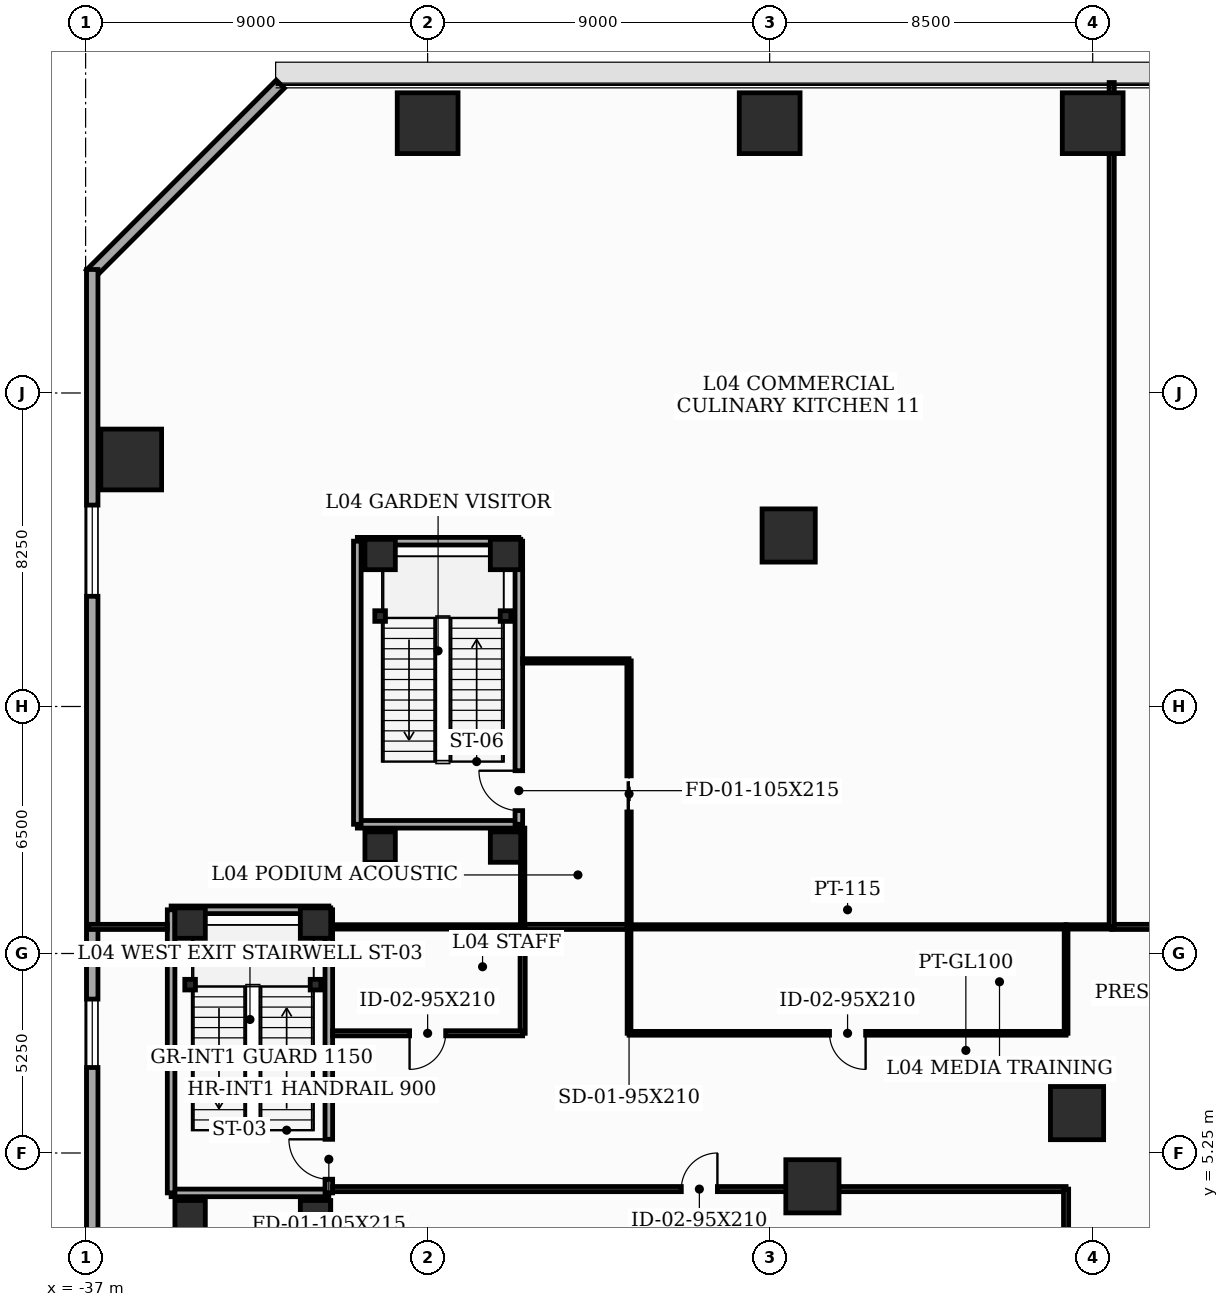
"""IFC4 building model, lengths in metres.
Left out: names, types, materials, properties, quantities, classifications, styles, units other than length and angle.
Written with IfcOpenShell. Run it as: python <this file> out.ifc"""

import sys

from ifc_helpers import new_model, si_unit, direction, frame, frame_2d, origin, origin_2d, place, context, subcontext, project, spatial, rectangle, i_section, extrude, element, fill, save


model = new_model("IFC4")
c1 = context("Model", 3, precision=1e-05, world=origin(), true_north=direction((0.0, 1.0)))
c2 = subcontext(c1, "Body", "Model", "MODEL_VIEW")
j1 = project(units=[si_unit("LENGTHUNIT", "METRE"), si_unit("PLANEANGLEUNIT", "RADIAN")], contexts=[c1])
p1 = place(None, origin())
s1 = spatial("IfcSite", under=j1, at=p1, CompositionType="ELEMENT")
p2 = place(p1, origin())
s2 = spatial("IfcBuilding", under=s1, at=p2, CompositionType="ELEMENT")
p3 = place(p2, frame((0.0, 0.0, 20.8)))
s3 = spatial("IfcBuildingStorey", under=s2, at=p3, CompositionType="ELEMENT", Elevation=20.8)
p4 = place(p3, frame((-10.912, 6.3, 0.0), z_axis=(0.0, 0.0, 1.0), x_axis=(1.0, 0.0, 0.0)))
e1 = element("IfcColumn", 1, at=p4, inside=s3, PredefinedType="COLUMN", context=c2, shape_type="SweptSolid", body=[
    extrude(rectangle(XDim=1.4, YDim=1.4, at=origin_2d()), origin(), (0.0, 0.0, 1.0), 5.2),
])
for number, where, z_axis, x_axis in (
    (2, (-10.5, 32.35, 0.0), (0.0, 0.0, 1.0), (1.0, 0.0, 0.0)),
    (3, (-19.0, 32.35, 0.0), (0.0, 0.0, 1.0), (1.0, 0.0, 0.0)),
    (4, (-28.0, 32.35, 0.0), (0.0, 0.0, 1.0), (1.0, 0.0, 0.0)),
    (5, (-35.8, 23.5, 0.0), (0.0, 0.0, 1.0), (1.0, 0.0, 0.0)),
):
    element("IfcColumn", number, at=place(p3, frame(where, z_axis=z_axis, x_axis=x_axis)), inside=s3, PredefinedType="COLUMN", context=c2, shape_type="SweptSolid", body=[
        extrude(rectangle(XDim=1.6, YDim=1.6, at=origin_2d()), origin(), (0.0, 0.0, 1.0), 5.2),
    ])
for number, where, z_axis, x_axis in (
    (6, (-18.5, 21.5, 0.0), (0.0, 0.0, 1.0), (1.0, 0.0, 0.0)),
    (7, (-17.875, 4.373, 0.0), (0.0, 0.0, 1.0), (1.0, 0.0, 0.0)),
):
    element("IfcColumn", number, at=place(p3, frame(where, z_axis=z_axis, x_axis=x_axis)), inside=s3, PredefinedType="COLUMN", context=c2, shape_type="SweptSolid", body=[
        extrude(rectangle(XDim=1.4, YDim=1.4, at=origin_2d()), origin(), (0.0, 0.0, 1.0), 5.2),
    ])
for number, where, z_axis, x_axis in (
    (8, (-34.25, 3.6, 0.0), (0.0, 0.0, 1.0), (1.0, 0.0, 0.0)),
    (9, (-30.95, 3.6, 0.0), (0.0, 0.0, 1.0), (1.0, 0.0, 0.0)),
    (10, (-30.95, 11.3, 0.0), (0.0, 0.0, 1.0), (1.0, 0.0, 0.0)),
    (11, (-34.25, 11.3, 0.0), (0.0, 0.0, 1.0), (1.0, 0.0, 0.0)),
):
    element("IfcColumn", number, at=place(p3, frame(where, z_axis=z_axis, x_axis=x_axis)), inside=s3, PredefinedType="COLUMN", context=c2, shape_type="SweptSolid", body=[
        extrude(rectangle(XDim=0.8, YDim=0.8, at=origin_2d()), origin(), (0.0, 0.0, 1.0), 5.2),
    ])
for number, where, z_axis, x_axis in (
    (12, (-34.25, 9.68, 0.0), (0.0, 0.0, 1.0), (1.0, 0.0, 0.0)),
    (13, (-30.95, 9.68, 0.0), (0.0, 0.0, 1.0), (1.0, 0.0, 0.0)),
):
    element("IfcColumn", number, at=place(p3, frame(where, z_axis=z_axis, x_axis=x_axis)), inside=s3, PredefinedType="PILASTER", context=c2, shape_type="SweptSolid", body=[
        extrude(i_section(OverallWidth=0.28, OverallDepth=0.28, WebThickness=0.01, FlangeThickness=0.018, at=origin_2d()), origin(), (0.0, 0.0, 1.0), 5.2),
    ])
for number, where, z_axis, x_axis in (
    (14, (-29.25, 13.3, 0.0), (0.0, 0.0, 1.0), (1.0, 0.0, 0.0)),
    (15, (-25.95, 13.3, 0.0), (0.0, 0.0, 1.0), (1.0, 0.0, 0.0)),
    (16, (-25.95, 21.0, 0.0), (0.0, 0.0, 1.0), (1.0, 0.0, 0.0)),
    (17, (-29.25, 21.0, 0.0), (0.0, 0.0, 1.0), (1.0, 0.0, 0.0)),
):
    element("IfcColumn", number, at=place(p3, frame(where, z_axis=z_axis, x_axis=x_axis)), inside=s3, PredefinedType="COLUMN", context=c2, shape_type="SweptSolid", body=[
        extrude(rectangle(XDim=0.8, YDim=0.8, at=origin_2d()), origin(), (0.0, 0.0, 1.0), 5.2),
    ])
for number, where, z_axis, x_axis in (
    (18, (-29.25, 19.38, 0.0), (0.0, 0.0, 1.0), (1.0, 0.0, 0.0)),
    (19, (-25.95, 19.38, 0.0), (0.0, 0.0, 1.0), (1.0, 0.0, 0.0)),
):
    element("IfcColumn", number, at=place(p3, frame(where, z_axis=z_axis, x_axis=x_axis)), inside=s3, PredefinedType="PILASTER", context=c2, shape_type="SweptSolid", body=[
        extrude(i_section(OverallWidth=0.28, OverallDepth=0.28, WebThickness=0.01, FlangeThickness=0.018, at=origin_2d()), origin(), (0.0, 0.0, 1.0), 5.2),
    ])
p5 = place(p3, frame((-31.876, 33.376, 0.0), z_axis=(0.0, 0.0, 1.0), x_axis=(-0.707106781187, -0.707106781187, 0.0)))
e20 = element("IfcWall", 20, at=p5, inside=s3, PredefinedType="SOLIDWALL", context=c2, shape_type="SweptSolid", body=[
    extrude(rectangle(XDim=7.071, YDim=0.3, at=frame_2d((3.536, 0.0))), origin(), (0.0, 0.0, 1.0), 4.94),
])
p6 = place(p3, frame((-36.825, 28.5, 0.0), z_axis=(0.0, 0.0, 1.0), x_axis=(0.0, -1.0, 0.0)))
e21 = element("IfcWall", 21, at=p6, inside=s3, PredefinedType="SOLIDWALL", context=c2, shape_type="SweptSolid", body=[
    extrude(rectangle(XDim=48.0, YDim=0.3, at=frame_2d((24.0, 0.0))), origin(), (0.0, 0.0, 1.0), 4.94),
])
p7 = place(p6, frame((6.2, 0.0, 0.9)))
e22 = element("IfcOpeningElement", 22, at=p7, cuts=e21, PredefinedType="OPENING", context=c2, shape_type="SweptSolid", body=[
    extrude(rectangle(XDim=2.4, YDim=1.35, at=frame_2d((1.2, 0.675))), frame((0.0, 0.16, 0.0), z_axis=(0.0, -1.0, 0.0), x_axis=(1.0, 0.0, 0.0)), (0.0, 0.0, 1.0), 0.32),
])
p8 = place(p6, frame((19.2, 0.0, 0.9)))
e23 = element("IfcOpeningElement", 23, at=p8, cuts=e21, PredefinedType="OPENING", context=c2, shape_type="SweptSolid", body=[
    extrude(rectangle(XDim=1.8, YDim=1.35, at=frame_2d((0.9, 0.675))), frame((0.0, 0.16, 0.0), z_axis=(0.0, -1.0, 0.0), x_axis=(1.0, 0.0, 0.0)), (0.0, 0.0, 1.0), 0.32),
])
p9 = place(p6, frame((36.2, 0.0, 0.9)))
e24 = element("IfcOpeningElement", 24, at=p9, cuts=e21, PredefinedType="OPENING", context=c2, shape_type="SweptSolid", body=[
    extrude(rectangle(XDim=2.4, YDim=1.35, at=frame_2d((1.2, 0.675))), frame((0.0, 0.16, 0.0), z_axis=(0.0, -1.0, 0.0), x_axis=(1.0, 0.0, 0.0)), (0.0, 0.0, 1.0), 0.32),
])
p10 = place(p3, frame((-34.75, 4.2, 0.0), z_axis=(0.0, 0.0, 1.0), x_axis=(1.0, 0.0, 0.0)))
e25 = element("IfcWall", 25, at=p10, inside=s3, PredefinedType="SOLIDWALL", context=c2, shape_type="SweptSolid", body=[
    extrude(rectangle(XDim=4.15, YDim=0.2, at=frame_2d((2.075, 0.0))), origin(), (0.0, 0.0, 1.0), 4.94),
])
p11 = place(p3, frame((-30.6, 4.2, 0.0), z_axis=(0.0, 0.0, 1.0), x_axis=(0.0, 1.0, 0.0)))
e26 = element("IfcWall", 26, at=p11, inside=s3, PredefinedType="SOLIDWALL", context=c2, shape_type="SweptSolid", body=[
    extrude(rectangle(XDim=7.45, YDim=0.2, at=frame_2d((3.725, 0.0))), origin(), (0.0, 0.0, 1.0), 4.94),
])
p12 = place(p11, frame((0.36, 0.0, 0.0)))
e27 = element("IfcOpeningElement", 27, at=p12, cuts=e26, PredefinedType="OPENING", context=c2, shape_type="SweptSolid", body=[
    extrude(rectangle(XDim=1.05, YDim=2.15, at=frame_2d((0.525, 1.075))), frame((0.0, 0.11, 0.0), z_axis=(0.0, -1.0, 0.0), x_axis=(1.0, 0.0, 0.0)), (0.0, 0.0, 1.0), 0.22),
])
p13 = place(p3, frame((-30.6, 11.65, 0.0), z_axis=(0.0, 0.0, 1.0), x_axis=(-1.0, 0.0, 0.0)))
e28 = element("IfcWall", 28, at=p13, inside=s3, PredefinedType="SOLIDWALL", context=c2, shape_type="SweptSolid", body=[
    extrude(rectangle(XDim=4.15, YDim=0.2, at=frame_2d((2.075, 0.0))), origin(), (0.0, 0.0, 1.0), 4.94),
])
p14 = place(p3, frame((-34.75, 11.65, 0.0), z_axis=(0.0, 0.0, 1.0), x_axis=(0.0, -1.0, 0.0)))
e29 = element("IfcWall", 29, at=p14, inside=s3, PredefinedType="SOLIDWALL", context=c2, shape_type="SweptSolid", body=[
    extrude(rectangle(XDim=7.45, YDim=0.2, at=frame_2d((3.725, 0.0))), origin(), (0.0, 0.0, 1.0), 4.94),
])
p15 = place(p3, frame((-29.85, 13.9, 0.0), z_axis=(0.0, 0.0, 1.0), x_axis=(1.0, 0.0, 0.0)))
e30 = element("IfcWall", 30, at=p15, inside=s3, PredefinedType="SOLIDWALL", context=c2, shape_type="SweptSolid", body=[
    extrude(rectangle(XDim=4.25, YDim=0.2, at=frame_2d((2.125, 0.0))), origin(), (0.0, 0.0, 1.0), 4.425),
])
p16 = place(p3, frame((-25.6, 13.9, 0.0), z_axis=(0.0, 0.0, 1.0), x_axis=(0.0, 1.0, 0.0)))
e31 = element("IfcWall", 31, at=p16, inside=s3, PredefinedType="SOLIDWALL", context=c2, shape_type="SweptSolid", body=[
    extrude(rectangle(XDim=7.45, YDim=0.2, at=frame_2d((3.725, 0.0))), origin(), (0.0, 0.0, 1.0), 4.425),
])
p17 = place(p16, frame((0.36, 0.0, 0.0)))
e32 = element("IfcOpeningElement", 32, at=p17, cuts=e31, PredefinedType="OPENING", context=c2, shape_type="SweptSolid", body=[
    extrude(rectangle(XDim=1.05, YDim=2.15, at=frame_2d((0.525, 1.075))), frame((0.0, 0.11, 0.0), z_axis=(0.0, -1.0, 0.0), x_axis=(1.0, 0.0, 0.0)), (0.0, 0.0, 1.0), 0.22),
])
p18 = place(p3, frame((-25.6, 21.35, 0.0), z_axis=(0.0, 0.0, 1.0), x_axis=(-1.0, 0.0, 0.0)))
e33 = element("IfcWall", 33, at=p18, inside=s3, PredefinedType="SOLIDWALL", context=c2, shape_type="SweptSolid", body=[
    extrude(rectangle(XDim=4.25, YDim=0.2, at=frame_2d((2.125, 0.0))), origin(), (0.0, 0.0, 1.0), 4.94),
])
p19 = place(p3, frame((-29.85, 21.35, 0.0), z_axis=(0.0, 0.0, 1.0), x_axis=(0.0, -1.0, 0.0)))
e34 = element("IfcWall", 34, at=p19, inside=s3, PredefinedType="SOLIDWALL", context=c2, shape_type="SweptSolid", body=[
    extrude(rectangle(XDim=7.45, YDim=0.2, at=frame_2d((3.725, 0.0))), origin(), (0.0, 0.0, 1.0), 4.425),
])
p20 = place(p3, frame((-22.7, 11.2, 0.0), z_axis=(0.0, 0.0, 1.0), x_axis=(-1.0, 0.0, 0.0)))
e35 = element("IfcWall", 35, at=p20, inside=s3, PredefinedType="PARTITIONING", context=c2, shape_type="SweptSolid", body=[
    extrude(rectangle(XDim=2.8, YDim=0.135, at=frame_2d((1.4, 0.0))), origin(), (0.0, 0.0, 1.0), 4.94),
])
p21 = place(p3, frame((-30.5, 4.3, 0.0), z_axis=(0.0, 0.0, 1.0), x_axis=(1.0, 0.0, 0.0)))
e36 = element("IfcWall", 36, at=p21, inside=s3, PredefinedType="PARTITIONING", context=c2, shape_type="SweptSolid", body=[
    extrude(rectangle(XDim=19.3, YDim=0.135, at=frame_2d((9.65, 0.0))), origin(), (0.0, 0.0, 1.0), 3.525),
])
p22 = place(p21, frame((9.175, 0.0, 0.0)))
e37 = element("IfcOpeningElement", 37, at=p22, cuts=e36, PredefinedType="OPENING", context=c2, shape_type="SweptSolid", body=[
    extrude(rectangle(XDim=0.95, YDim=2.1, at=frame_2d((0.475, 1.05))), frame((0.0, 0.077, 0.0), z_axis=(0.0, -1.0, 0.0), x_axis=(1.0, 0.0, 0.0)), (0.0, 0.0, 1.0), 0.155),
])
p23 = place(p3, frame((-11.2, 4.3, 0.0), z_axis=(0.0, 0.0, 1.0), x_axis=(0.0, -1.0, 0.0)))
e38 = element("IfcWall", 38, at=p23, inside=s3, PredefinedType="PARTITIONING", context=c2, shape_type="SweptSolid", body=[
    extrude(rectangle(XDim=7.9, YDim=0.135, at=frame_2d((3.95, 0.0))), origin(), (0.0, 0.0, 1.0), 3.525),
])
p24 = place(p3, frame((7.0, 11.2, 0.0), z_axis=(0.0, 0.0, 1.0), x_axis=(-1.0, 0.0, 0.0)))
e39 = element("IfcWall", 39, at=p24, inside=s3, PredefinedType="PARTITIONING", context=c2, shape_type="SweptSolid", body=[
    extrude(rectangle(XDim=17.0, YDim=0.135, at=frame_2d((8.5, 0.0))), origin(), (0.0, 0.0, 1.0), 3.525),
])
p25 = place(p24, frame((10.065, 0.0, 0.0)))
e40 = element("IfcOpeningElement", 40, at=p25, cuts=e39, PredefinedType="OPENING", context=c2, shape_type="SweptSolid", body=[
    extrude(rectangle(XDim=0.95, YDim=2.1, at=frame_2d((0.475, 1.05))), frame((0.0, 0.077, 0.0), z_axis=(0.0, -1.0, 0.0), x_axis=(1.0, 0.0, 0.0)), (0.0, 0.0, 1.0), 0.155),
])
p26 = place(p3, frame((-10.0, 11.2, 0.0), z_axis=(0.0, 0.0, 1.0), x_axis=(-1.0, 0.0, 0.0)))
e41 = element("IfcWall", 41, at=p26, inside=s3, PredefinedType="PARTITIONING", context=c2, shape_type="SweptSolid", body=[
    extrude(rectangle(XDim=1.2, YDim=0.115, at=frame_2d((0.6, 0.0))), origin(), (0.0, 0.0, 1.0), 3.525),
])
p27 = place(p3, frame((-11.2, 11.2, 0.0), z_axis=(0.0, 0.0, 1.0), x_axis=(0.0, -1.0, 0.0)))
e42 = element("IfcWall", 42, at=p27, inside=s3, PredefinedType="MOVABLE", context=c2, shape_type="SweptSolid", body=[
    extrude(rectangle(XDim=2.8, YDim=0.1, at=frame_2d((1.4, 0.0))), origin(), (0.0, 0.0, 1.0), 3.525),
])
p28 = place(p3, frame((-11.2, 8.4, 0.0), z_axis=(0.0, 0.0, 1.0), x_axis=(-1.0, 0.0, 0.0)))
e43 = element("IfcWall", 43, at=p28, inside=s3, PredefinedType="MOVABLE", context=c2, shape_type="SweptSolid", body=[
    extrude(rectangle(XDim=11.5, YDim=0.1, at=frame_2d((5.75, 0.0))), origin(), (0.0, 0.0, 1.0), 3.525),
])
p29 = place(p28, frame((5.275, 0.0, 0.0)))
e44 = element("IfcOpeningElement", 44, at=p29, cuts=e43, PredefinedType="OPENING", context=c2, shape_type="SweptSolid", body=[
    extrude(rectangle(XDim=0.95, YDim=2.1, at=frame_2d((0.475, 1.05))), frame((0.0, 0.06, 0.0), z_axis=(0.0, -1.0, 0.0), x_axis=(1.0, 0.0, 0.0)), (0.0, 0.0, 1.0), 0.12),
])
p30 = place(p3, frame((-22.7, 8.4, 0.0), z_axis=(0.0, 0.0, 1.0), x_axis=(0.0, 1.0, 0.0)))
e45 = element("IfcWall", 45, at=p30, inside=s3, PredefinedType="MOVABLE", context=c2, shape_type="SweptSolid", body=[
    extrude(rectangle(XDim=2.8, YDim=0.1, at=frame_2d((1.4, 0.0))), origin(), (0.0, 0.0, 1.0), 4.94),
])
p31 = place(p3, frame((-25.5, 11.2, 0.0), z_axis=(0.0, 0.0, 1.0), x_axis=(0.0, -1.0, 0.0)))
e46 = element("IfcWall", 46, at=p31, inside=s3, PredefinedType="PARTITIONING", context=c2, shape_type="SweptSolid", body=[
    extrude(rectangle(XDim=2.8, YDim=0.135, at=frame_2d((1.4, 0.0))), origin(), (0.0, 0.0, 1.0), 4.94),
])
p32 = place(p3, frame((-25.5, 8.4, 0.0), z_axis=(0.0, 0.0, 1.0), x_axis=(-1.0, 0.0, 0.0)))
e47 = element("IfcWall", 47, at=p32, inside=s3, PredefinedType="PARTITIONING", context=c2, shape_type="SweptSolid", body=[
    extrude(rectangle(XDim=5.0, YDim=0.135, at=frame_2d((2.5, 0.0))), origin(), (0.0, 0.0, 1.0), 4.94),
])
p33 = place(p32, frame((2.025, 0.0, 0.0)))
e48 = element("IfcOpeningElement", 48, at=p33, cuts=e47, PredefinedType="OPENING", context=c2, shape_type="SweptSolid", body=[
    extrude(rectangle(XDim=0.95, YDim=2.1, at=frame_2d((0.475, 1.05))), frame((0.0, 0.077, 0.0), z_axis=(0.0, -1.0, 0.0), x_axis=(1.0, 0.0, 0.0)), (0.0, 0.0, 1.0), 0.155),
])
p34 = place(p3, frame((-25.5, 13.8, 0.0), z_axis=(0.0, 0.0, 1.0), x_axis=(0.0, -1.0, 0.0)))
e49 = element("IfcWall", 49, at=p34, inside=s3, PredefinedType="PARTITIONING", context=c2, shape_type="SweptSolid", body=[
    extrude(rectangle(XDim=2.6, YDim=0.115, at=frame_2d((1.3, 0.0))), origin(), (0.0, 0.0, 1.0), 4.425),
])
p35 = place(p3, frame((-22.7, 11.2, 0.0), z_axis=(0.0, 0.0, 1.0), x_axis=(0.0, 1.0, 0.0)))
e50 = element("IfcWall", 50, at=p35, inside=s3, PredefinedType="PARTITIONING", context=c2, shape_type="SweptSolid", body=[
    extrude(rectangle(XDim=7.0, YDim=0.115, at=frame_2d((3.5, 0.0))), origin(), (0.0, 0.0, 1.0), 4.425),
])
p36 = place(p35, frame((3.025, 0.0, 0.0)))
e51 = element("IfcOpeningElement", 51, at=p36, cuts=e50, PredefinedType="OPENING", context=c2, shape_type="SweptSolid", body=[
    extrude(rectangle(XDim=0.95, YDim=2.1, at=frame_2d((0.475, 1.05))), frame((0.0, 0.067, 0.0), z_axis=(0.0, -1.0, 0.0), x_axis=(1.0, 0.0, 0.0)), (0.0, 0.0, 1.0), 0.135),
])
p37 = place(p3, frame((-22.7, 18.2, 0.0), z_axis=(0.0, 0.0, 1.0), x_axis=(-1.0, 0.0, 0.0)))
e52 = element("IfcWall", 52, at=p37, inside=s3, PredefinedType="PARTITIONING", context=c2, shape_type="SweptSolid", body=[
    extrude(rectangle(XDim=2.8, YDim=0.115, at=frame_2d((1.4, 0.0))), origin(), (0.0, 0.0, 1.0), 4.94),
])
p38 = place(p3, frame((-34.85, 11.2, 0.0), z_axis=(0.0, 0.0, 1.0), x_axis=(-1.0, 0.0, 0.0)))
e53 = element("IfcWall", 53, at=p38, inside=s3, PredefinedType="PARTITIONING", context=c2, shape_type="SweptSolid", body=[
    extrude(rectangle(XDim=2.07, YDim=0.135, at=frame_2d((1.035, 0.0))), origin(), (0.0, 0.0, 1.0), 3.425),
])
p39 = place(p3, frame((-10.0, 33.42, 0.0), z_axis=(0.0, 0.0, 1.0), x_axis=(0.0, -1.0, 0.0)))
e54 = element("IfcWall", 54, at=p39, inside=s3, PredefinedType="PARTITIONING", context=c2, shape_type="SweptSolid", body=[
    extrude(rectangle(XDim=22.22, YDim=0.135, at=frame_2d((11.11, 0.0))), origin(), (0.0, 0.0, 1.0), 3.425),
])
p40 = place(p3, frame((-22.7, 11.2, 0.0), z_axis=(0.0, 0.0, 1.0), x_axis=(1.0, 0.0, 0.0)))
e55 = element("IfcWall", 55, at=p40, inside=s3, PredefinedType="PARTITIONING", context=c2, shape_type="SweptSolid", body=[
    extrude(rectangle(XDim=11.5, YDim=0.115, at=frame_2d((5.75, 0.0))), origin(), (0.0, 0.0, 1.0), 3.525),
])
p41 = place(p3, frame((-30.5, 11.2, 0.0), z_axis=(0.0, 0.0, 1.0), x_axis=(1.0, 0.0, 0.0)))
e56 = element("IfcWall", 56, at=p41, inside=s3, PredefinedType="PARTITIONING", context=c2, shape_type="SweptSolid", body=[
    extrude(rectangle(XDim=5.0, YDim=0.115, at=frame_2d((2.5, 0.0))), origin(), (0.0, 0.0, 1.0), 4.94),
])
p42 = place(p7, origin())
e57 = element("IfcWindow", 57, at=p42, inside=s3, PartitioningType="SINGLE_PANEL", PredefinedType="WINDOW", context=c2, shape_type="SweptSolid", body=[
    extrude(rectangle(XDim=2.4, YDim=1.35, at=frame_2d((1.2, 0.675))), frame((0.0, 0.03, 0.0), z_axis=(0.0, -1.0, 0.0), x_axis=(1.0, 0.0, 0.0)), (0.0, 0.0, 1.0), 0.06),
])
fill(e22, e57)
p43 = place(p8, origin())
e58 = element("IfcWindow", 58, at=p43, inside=s3, PartitioningType="SINGLE_PANEL", PredefinedType="WINDOW", context=c2, shape_type="SweptSolid", body=[
    extrude(rectangle(XDim=1.8, YDim=1.35, at=frame_2d((0.9, 0.675))), frame((0.0, 0.03, 0.0), z_axis=(0.0, -1.0, 0.0), x_axis=(1.0, 0.0, 0.0)), (0.0, 0.0, 1.0), 0.06),
])
fill(e23, e58)
p44 = place(p12, origin())
e59 = element("IfcDoor", 59, at=p44, inside=s3, OperationType="SINGLE_SWING_RIGHT", PredefinedType="DOOR", context=c2, shape_type="SweptSolid", body=[
    extrude(rectangle(XDim=1.05, YDim=2.15, at=frame_2d((0.525, 1.075))), frame((0.0, 0.025, 0.0), z_axis=(0.0, -1.0, 0.0), x_axis=(1.0, 0.0, 0.0)), (0.0, 0.0, 1.0), 0.05),
])
fill(e27, e59)
p45 = place(p17, origin())
e60 = element("IfcDoor", 60, at=p45, inside=s3, OperationType="SINGLE_SWING_RIGHT", PredefinedType="DOOR", context=c2, shape_type="SweptSolid", body=[
    extrude(rectangle(XDim=1.05, YDim=2.15, at=frame_2d((0.525, 1.075))), frame((0.0, 0.025, 0.0), z_axis=(0.0, -1.0, 0.0), x_axis=(1.0, 0.0, 0.0)), (0.0, 0.0, 1.0), 0.05),
])
fill(e32, e60)
p46 = place(p22, origin())
e61 = element("IfcDoor", 61, at=p46, inside=s3, OperationType="SINGLE_SWING_RIGHT", PredefinedType="DOOR", context=c2, shape_type="SweptSolid", body=[
    extrude(rectangle(XDim=0.95, YDim=2.1, at=frame_2d((0.475, 1.05))), frame((0.0, 0.025, 0.0), z_axis=(0.0, -1.0, 0.0), x_axis=(1.0, 0.0, 0.0)), (0.0, 0.0, 1.0), 0.05),
])
fill(e37, e61)
p47 = place(p29, origin())
e62 = element("IfcDoor", 62, at=p47, inside=s3, OperationType="SINGLE_SWING_LEFT", PredefinedType="DOOR", context=c2, shape_type="SweptSolid", body=[
    extrude(rectangle(XDim=0.95, YDim=2.1, at=frame_2d((0.475, 1.05))), frame((0.0, 0.025, 0.0), z_axis=(0.0, -1.0, 0.0), x_axis=(1.0, 0.0, 0.0)), (0.0, 0.0, 1.0), 0.05),
])
fill(e44, e62)
p48 = place(p33, origin())
e63 = element("IfcDoor", 63, at=p48, inside=s3, OperationType="SINGLE_SWING_RIGHT", PredefinedType="DOOR", context=c2, shape_type="SweptSolid", body=[
    extrude(rectangle(XDim=0.95, YDim=2.1, at=frame_2d((0.475, 1.05))), frame((0.0, 0.025, 0.0), z_axis=(0.0, -1.0, 0.0), x_axis=(1.0, 0.0, 0.0)), (0.0, 0.0, 1.0), 0.05),
])
fill(e48, e63)
p49 = place(p36, origin())
e64 = element("IfcDoor", 64, at=p49, inside=s3, OperationType="SLIDING_TO_LEFT", PredefinedType="DOOR", context=c2, shape_type="SweptSolid", body=[
    extrude(rectangle(XDim=0.95, YDim=2.1, at=frame_2d((0.475, 1.05))), frame((0.0, 0.025, 0.0), z_axis=(0.0, -1.0, 0.0), x_axis=(1.0, 0.0, 0.0)), (0.0, 0.0, 1.0), 0.05),
])
fill(e51, e64)
save(model, sys.argv[1])
